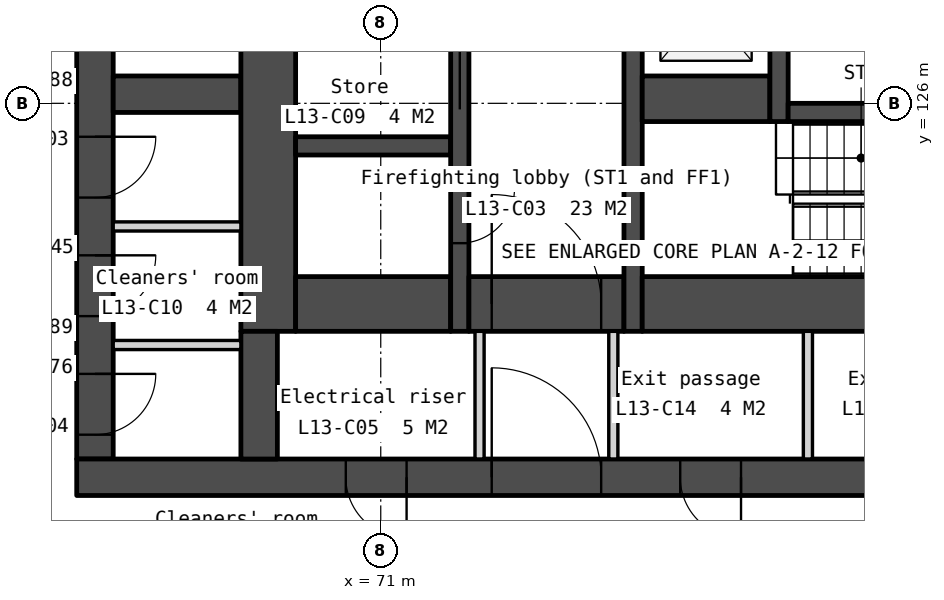
"""IFC4 building model, lengths in metres.
Left out: names, types, materials, properties, quantities, classifications, styles, units other than length and angle.
Written with IfcOpenShell. Run it as: python <this file> out.ifc"""

import sys

from ifc_helpers import new_model, si_unit, direction, frame, frame_2d, origin, place, context, subcontext, project, spatial, polyline, rectangle, outline, extrude, element, fill, save


model = new_model("IFC4")
c1 = context("Model", 3, precision=1e-05, world=origin(), true_north=direction((0.0, 1.0)))
c2 = subcontext(c1, "Body", "Model", "MODEL_VIEW")
j1 = project(units=[si_unit("LENGTHUNIT", "METRE"), si_unit("PLANEANGLEUNIT", "RADIAN")], contexts=[c1])
p1 = place(None, origin())
s1 = spatial("IfcSite", under=j1, at=p1, CompositionType="ELEMENT")
p2 = place(p1, origin())
s2 = spatial("IfcBuilding", under=s1, at=p2, CompositionType="ELEMENT")
p3 = place(p2, frame((0.0, 0.0, 59.5)))
s3 = spatial("IfcBuildingStorey", under=s2, at=p3, CompositionType="ELEMENT", Elevation=59.5)
p4 = place(p3, frame((66.3, 133.95, 0.0), z_axis=(0.0, 0.0, 1.0), x_axis=(0.0, -1.0, 0.0)))
e1 = element("IfcWall", 1, at=p4, inside=s3, PredefinedType="SOLIDWALL", context=c2, shape_type="SweptSolid", body=[
    extrude(rectangle(XDim=13.8, YDim=0.6, at=frame_2d((6.9, 0.0))), origin(), (0.0, 0.0, 1.0), 3.35),
])
p5 = place(p4, frame((0.6, 0.0, 0.0)))
e2 = element("IfcOpeningElement", 2, at=p5, cuts=e1, PredefinedType="OPENING", context=c2, shape_type="SweptSolid", body=[
    extrude(rectangle(XDim=1.1, YDim=2.1, at=frame_2d((0.55, 1.05))), frame((0.0, 0.31, 0.0), z_axis=(0.0, -1.0, 0.0), x_axis=(1.0, 0.0, 0.0)), (0.0, 0.0, 1.0), 0.62),
])
p6 = place(p4, frame((12.4, 0.0, 0.0)))
e3 = element("IfcOpeningElement", 3, at=p6, cuts=e1, PredefinedType="OPENING", context=c2, shape_type="SweptSolid", body=[
    extrude(rectangle(XDim=1.0, YDim=2.1, at=frame_2d((0.5, 1.05))), frame((0.0, 0.31, 0.0), z_axis=(0.0, -1.0, 0.0), x_axis=(1.0, 0.0, 0.0)), (0.0, 0.0, 1.0), 0.62),
])
p7 = place(p4, frame((8.5, 0.0, 0.0)))
e4 = element("IfcOpeningElement", 4, at=p7, cuts=e1, PredefinedType="OPENING", context=c2, shape_type="SweptSolid", body=[
    extrude(rectangle(XDim=1.0, YDim=2.1, at=frame_2d((0.5, 1.05))), frame((0.0, 0.31, 0.0), z_axis=(0.0, -1.0, 0.0), x_axis=(1.0, 0.0, 0.0)), (0.0, 0.0, 1.0), 0.62),
])
p8 = place(p4, frame((10.45, 0.0, 0.0)))
e5 = element("IfcOpeningElement", 5, at=p8, cuts=e1, PredefinedType="OPENING", context=c2, shape_type="SweptSolid", body=[
    extrude(rectangle(XDim=1.0, YDim=2.1, at=frame_2d((0.5, 1.05))), frame((0.0, 0.31, 0.0), z_axis=(0.0, -1.0, 0.0), x_axis=(1.0, 0.0, 0.0)), (0.0, 0.0, 1.0), 0.62),
])
p9 = place(p3, frame((66.0, 119.85, 0.0), z_axis=(0.0, 0.0, 1.0), x_axis=(1.0, 0.0, 0.0)))
e6 = element("IfcWall", 6, at=p9, inside=s3, PredefinedType="SOLIDWALL", context=c2, shape_type="SweptSolid", body=[
    extrude(rectangle(XDim=28.0, YDim=0.6, at=frame_2d((14.0, 0.0))), origin(), (0.0, 0.0, 1.0), 3.35),
])
p10 = place(p9, frame((6.825, 0.0, 0.0)))
e7 = element("IfcOpeningElement", 7, at=p10, cuts=e6, PredefinedType="OPENING", context=c2, shape_type="SweptSolid", body=[
    extrude(rectangle(XDim=1.8, YDim=2.1, at=frame_2d((0.9, 1.05))), frame((0.0, 0.31, 0.0), z_axis=(0.0, -1.0, 0.0), x_axis=(1.0, 0.0, 0.0)), (0.0, 0.0, 1.0), 0.62),
])
p11 = place(p9, frame((15.85, 0.0, 0.0)))
e8 = element("IfcOpeningElement", 8, at=p11, cuts=e6, PredefinedType="OPENING", context=c2, shape_type="SweptSolid", body=[
    extrude(rectangle(XDim=1.5, YDim=2.1, at=frame_2d((0.75, 1.05))), frame((0.0, 0.31, 0.0), z_axis=(0.0, -1.0, 0.0), x_axis=(1.0, 0.0, 0.0)), (0.0, 0.0, 1.0), 0.62),
])
p12 = place(p9, frame((19.375, 0.0, 0.0)))
e9 = element("IfcOpeningElement", 9, at=p12, cuts=e6, PredefinedType="OPENING", context=c2, shape_type="SweptSolid", body=[
    extrude(rectangle(XDim=1.8, YDim=2.1, at=frame_2d((0.9, 1.05))), frame((0.0, 0.31, 0.0), z_axis=(0.0, -1.0, 0.0), x_axis=(1.0, 0.0, 0.0)), (0.0, 0.0, 1.0), 0.62),
])
p13 = place(p9, frame((4.425, 0.0, 0.0)))
e10 = element("IfcOpeningElement", 10, at=p13, cuts=e6, PredefinedType="OPENING", context=c2, shape_type="SweptSolid", body=[
    extrude(rectangle(XDim=1.0, YDim=2.1, at=frame_2d((0.5, 1.05))), frame((0.0, 0.31, 0.0), z_axis=(0.0, -1.0, 0.0), x_axis=(1.0, 0.0, 0.0)), (0.0, 0.0, 1.0), 0.62),
])
p14 = place(p9, frame((9.925, 0.0, 0.0)))
e11 = element("IfcOpeningElement", 11, at=p14, cuts=e6, PredefinedType="OPENING", context=c2, shape_type="SweptSolid", body=[
    extrude(rectangle(XDim=1.0, YDim=2.1, at=frame_2d((0.5, 1.05))), frame((0.0, 0.31, 0.0), z_axis=(0.0, -1.0, 0.0), x_axis=(1.0, 0.0, 0.0)), (0.0, 0.0, 1.0), 0.62),
])
p15 = place(p9, frame((13.125, 0.0, 0.0)))
e12 = element("IfcOpeningElement", 12, at=p15, cuts=e6, PredefinedType="OPENING", context=c2, shape_type="SweptSolid", body=[
    extrude(rectangle(XDim=1.0, YDim=2.1, at=frame_2d((0.5, 1.05))), frame((0.0, 0.31, 0.0), z_axis=(0.0, -1.0, 0.0), x_axis=(1.0, 0.0, 0.0)), (0.0, 0.0, 1.0), 0.62),
])
p16 = place(p9, frame((21.725, 0.0, 0.0)))
e13 = element("IfcOpeningElement", 13, at=p16, cuts=e6, PredefinedType="OPENING", context=c2, shape_type="SweptSolid", body=[
    extrude(rectangle(XDim=1.0, YDim=2.1, at=frame_2d((0.5, 1.05))), frame((0.0, 0.31, 0.0), z_axis=(0.0, -1.0, 0.0), x_axis=(1.0, 0.0, 0.0)), (0.0, 0.0, 1.0), 0.62),
])
p17 = place(p9, frame((23.425, 0.0, 0.0)))
e14 = element("IfcOpeningElement", 14, at=p17, cuts=e6, PredefinedType="OPENING", context=c2, shape_type="SweptSolid", body=[
    extrude(rectangle(XDim=1.0, YDim=2.1, at=frame_2d((0.5, 1.05))), frame((0.0, 0.31, 0.0), z_axis=(0.0, -1.0, 0.0), x_axis=(1.0, 0.0, 0.0)), (0.0, 0.0, 1.0), 0.62),
])
p18 = place(p3, frame((66.6, 126.15, 0.0), z_axis=(0.0, 0.0, 1.0), x_axis=(1.0, 0.0, 0.0)))
e15 = element("IfcWall", 15, at=p18, inside=s3, PredefinedType="SOLIDWALL", context=c2, shape_type="SweptSolid", body=[
    extrude(rectangle(XDim=2.1, YDim=0.6, at=frame_2d((1.05, 0.0))), origin(), (0.0, 0.0, 1.0), 3.35),
])
for number, where, z_axis, x_axis in (
    (16, (66.6, 123.975, 0.0), (0.0, 0.0, 1.0), (1.0, 0.0, 0.0)),
    (17, (66.6, 122.025, 0.0), (0.0, 0.0, 1.0), (1.0, 0.0, 0.0)),
):
    element("IfcWall", number, at=place(p3, frame(where, z_axis=z_axis, x_axis=x_axis)), inside=s3, PredefinedType="PARTITIONING", context=c2, shape_type="SweptSolid", body=[
        extrude(rectangle(XDim=2.1, YDim=0.15, at=frame_2d((1.05, 0.0))), origin(), (0.0, 0.0, 1.0), 3.35),
    ])
p19 = place(p3, frame((69.15, 133.95, 0.0), z_axis=(0.0, 0.0, 1.0), x_axis=(0.0, -1.0, 0.0)))
e18 = element("IfcWall", 18, at=p19, inside=s3, PredefinedType="SOLIDWALL", context=c2, shape_type="SweptSolid", body=[
    extrude(rectangle(XDim=11.7, YDim=0.9, at=frame_2d((5.85, 0.0))), origin(), (0.0, 0.0, 1.0), 3.35),
])
p20 = place(p3, frame((69.0, 122.25, 0.0), z_axis=(0.0, 0.0, 1.0), x_axis=(0.0, -1.0, 0.0)))
e19 = element("IfcWall", 19, at=p20, inside=s3, PredefinedType="SOLIDWALL", context=c2, shape_type="SweptSolid", body=[
    extrude(rectangle(XDim=2.1, YDim=0.6, at=frame_2d((1.05, 0.0))), origin(), (0.0, 0.0, 1.0), 3.35),
])
p21 = place(p3, frame((69.6, 125.3, 0.0), z_axis=(0.0, 0.0, 1.0), x_axis=(1.0, 0.0, 0.0)))
e20 = element("IfcWall", 20, at=p21, inside=s3, PredefinedType="SOLIDWALL", context=c2, shape_type="SweptSolid", body=[
    extrude(rectangle(XDim=2.55, YDim=0.3, at=frame_2d((1.275, 0.0))), origin(), (0.0, 0.0, 1.0), 3.35),
])
p22 = place(p3, frame((69.6, 122.7, 0.0), z_axis=(0.0, 0.0, 1.0), x_axis=(1.0, 0.0, 0.0)))
e21 = element("IfcWall", 21, at=p22, inside=s3, PredefinedType="SOLIDWALL", context=c2, shape_type="SweptSolid", body=[
    extrude(rectangle(XDim=2.55, YDim=0.9, at=frame_2d((1.275, 0.0))), origin(), (0.0, 0.0, 1.0), 3.35),
])
p23 = place(p3, frame((72.3, 133.95, 0.0), z_axis=(0.0, 0.0, 1.0), x_axis=(0.0, -1.0, 0.0)))
e22 = element("IfcWall", 22, at=p23, inside=s3, PredefinedType="SOLIDWALL", context=c2, shape_type="SweptSolid", body=[
    extrude(rectangle(XDim=11.7, YDim=0.3, at=frame_2d((5.85, 0.0))), origin(), (0.0, 0.0, 1.0), 3.35),
])
p24 = place(p23, frame((6.95, 0.0, 0.0)))
e23 = element("IfcOpeningElement", 23, at=p24, cuts=e22, PredefinedType="OPENING", context=c2, shape_type="SweptSolid", body=[
    extrude(rectangle(XDim=1.1, YDim=2.1, at=frame_2d((0.55, 1.05))), frame((0.0, 0.16, 0.0), z_axis=(0.0, -1.0, 0.0), x_axis=(1.0, 0.0, 0.0)), (0.0, 0.0, 1.0), 0.32),
])
p25 = place(p23, frame((9.35, 0.0, 0.0)))
e24 = element("IfcOpeningElement", 24, at=p25, cuts=e22, PredefinedType="OPENING", context=c2, shape_type="SweptSolid", body=[
    extrude(rectangle(XDim=0.9, YDim=2.1, at=frame_2d((0.45, 1.05))), frame((0.0, 0.16, 0.0), z_axis=(0.0, -1.0, 0.0), x_axis=(1.0, 0.0, 0.0)), (0.0, 0.0, 1.0), 0.32),
])
p26 = place(p23, frame((5.1, 0.0, 0.0)))
e25 = element("IfcOpeningElement", 25, at=p26, cuts=e22, PredefinedType="OPENING", context=c2, shape_type="SweptSolid", body=[
    extrude(rectangle(XDim=1.0, YDim=2.1, at=frame_2d((0.5, 1.05))), frame((0.0, 0.16, 0.0), z_axis=(0.0, -1.0, 0.0), x_axis=(1.0, 0.0, 0.0)), (0.0, 0.0, 1.0), 0.32),
])
p27 = place(p3, frame((72.45, 122.7, 0.0), z_axis=(0.0, 0.0, 1.0), x_axis=(1.0, 0.0, 0.0)))
e26 = element("IfcWall", 26, at=p27, inside=s3, PredefinedType="SOLIDWALL", context=c2, shape_type="SweptSolid", body=[
    extrude(rectangle(XDim=2.55, YDim=0.9, at=frame_2d((1.275, 0.0))), origin(), (0.0, 0.0, 1.0), 3.35),
])
p28 = place(p27, frame((0.375, 0.0, 0.0)))
e27 = element("IfcOpeningElement", 27, at=p28, cuts=e26, PredefinedType="OPENING", context=c2, shape_type="SweptSolid", body=[
    extrude(rectangle(XDim=1.8, YDim=2.1, at=frame_2d((0.9, 1.05))), frame((0.0, 0.46, 0.0), z_axis=(0.0, -1.0, 0.0), x_axis=(1.0, 0.0, 0.0)), (0.0, 0.0, 1.0), 0.92),
])
for number, where, z_axis, x_axis in (
    (28, (72.625, 122.25, 0.0), (0.0, 0.0, 1.0), (0.0, -1.0, 0.0)),
    (29, (74.825, 122.25, 0.0), (0.0, 0.0, 1.0), (0.0, -1.0, 0.0)),
):
    element("IfcWall", number, at=place(p3, frame(where, z_axis=z_axis, x_axis=x_axis)), inside=s3, PredefinedType="PARTITIONING", context=c2, shape_type="SweptSolid", body=[
        extrude(rectangle(XDim=2.1, YDim=0.15, at=frame_2d((1.05, 0.0))), origin(), (0.0, 0.0, 1.0), 3.35),
    ])
p29 = place(p3, frame((75.15, 133.95, 0.0), z_axis=(0.0, 0.0, 1.0), x_axis=(0.0, -1.0, 0.0)))
e30 = element("IfcWall", 30, at=p29, inside=s3, PredefinedType="SOLIDWALL", context=c2, shape_type="SweptSolid", body=[
    extrude(rectangle(XDim=11.7, YDim=0.3, at=frame_2d((5.85, 0.0))), origin(), (0.0, 0.0, 1.0), 3.35),
])
p30 = place(p3, frame((75.3, 126.075, 0.0), z_axis=(0.0, 0.0, 1.0), x_axis=(1.0, 0.0, 0.0)))
e31 = element("IfcWall", 31, at=p30, inside=s3, PredefinedType="SOLIDWALL", context=c2, shape_type="SweptSolid", body=[
    extrude(rectangle(XDim=2.1, YDim=0.75, at=frame_2d((1.05, 0.0))), origin(), (0.0, 0.0, 1.0), 3.35),
])
p31 = place(p3, frame((75.3, 122.7, 0.0), z_axis=(0.0, 0.0, 1.0), x_axis=(1.0, 0.0, 0.0)))
e32 = element("IfcWall", 32, at=p31, inside=s3, PredefinedType="SOLIDWALL", context=c2, shape_type="SweptSolid", body=[
    extrude(rectangle(XDim=6.2, YDim=0.9, at=frame_2d((3.1, 0.0))), origin(), (0.0, 0.0, 1.0), 3.35),
])
p32 = place(p3, frame((77.55, 133.95, 0.0), z_axis=(0.0, 0.0, 1.0), x_axis=(0.0, -1.0, 0.0)))
e33 = element("IfcWall", 33, at=p32, inside=s3, PredefinedType="SOLIDWALL", context=c2, shape_type="SweptSolid", body=[
    extrude(rectangle(XDim=8.25, YDim=0.3, at=frame_2d((4.125, 0.0))), origin(), (0.0, 0.0, 1.0), 3.35),
])
p33 = place(p32, frame((0.6, 0.0, 0.0)))
e34 = element("IfcOpeningElement", 34, at=p33, cuts=e33, PredefinedType="OPENING", context=c2, shape_type="SweptSolid", body=[
    extrude(rectangle(XDim=1.1, YDim=2.1, at=frame_2d((0.55, 1.05))), frame((0.0, 0.16, 0.0), z_axis=(0.0, -1.0, 0.0), x_axis=(1.0, 0.0, 0.0)), (0.0, 0.0, 1.0), 0.32),
])
p34 = place(p32, frame((3.2, 0.0, 0.0)))
e35 = element("IfcOpeningElement", 35, at=p34, cuts=e33, PredefinedType="OPENING", context=c2, shape_type="SweptSolid", body=[
    extrude(rectangle(XDim=1.1, YDim=2.1, at=frame_2d((0.55, 1.05))), frame((0.0, 0.16, 0.0), z_axis=(0.0, -1.0, 0.0), x_axis=(1.0, 0.0, 0.0)), (0.0, 0.0, 1.0), 0.32),
])
p35 = place(p32, frame((5.8, 0.0, 0.0)))
e36 = element("IfcOpeningElement", 36, at=p35, cuts=e33, PredefinedType="OPENING", context=c2, shape_type="SweptSolid", body=[
    extrude(rectangle(XDim=1.1, YDim=2.1, at=frame_2d((0.55, 1.05))), frame((0.0, 0.16, 0.0), z_axis=(0.0, -1.0, 0.0), x_axis=(1.0, 0.0, 0.0)), (0.0, 0.0, 1.0), 0.32),
])
p36 = place(p3, frame((77.7, 125.85, 0.0), z_axis=(0.0, 0.0, 1.0), x_axis=(1.0, 0.0, 0.0)))
e37 = element("IfcWall", 37, at=p36, inside=s3, PredefinedType="SOLIDWALL", context=c2, shape_type="SweptSolid", body=[
    extrude(rectangle(XDim=4.6, YDim=0.3, at=frame_2d((2.3, 0.0))), origin(), (0.0, 0.0, 1.0), 3.35),
])
p37 = place(p3, frame((78.025, 122.25, 0.0), z_axis=(0.0, 0.0, 1.0), x_axis=(0.0, -1.0, 0.0)))
e38 = element("IfcWall", 38, at=p37, inside=s3, PredefinedType="PARTITIONING", context=c2, shape_type="SweptSolid", body=[
    extrude(rectangle(XDim=2.1, YDim=0.15, at=frame_2d((1.05, 0.0))), origin(), (0.0, 0.0, 1.0), 3.35),
])
p38 = place(p3, frame((54.495, 129.397, -0.15), z_axis=(0.0, 0.0, 1.0), x_axis=(0.499999201451, -0.866025864826, 0.0)))
e39 = element("IfcWall", 39, at=p38, inside=s3, PredefinedType="SOLIDWALL", context=c2, shape_type="SweptSolid", body=[
    extrude(outline(polyline([(44.8, 0.0), (44.8, 3.5), (0.0, 3.5), (0.0, 0.0), (44.8, 0.0)])), frame((0.0, 0.225, 0.0), z_axis=(0.0, -1.0, 0.0), x_axis=(1.0, 0.0, 0.0)), (0.0, 0.0, 1.0), 0.45),
])
p39 = place(p38, frame((3.03, 0.0, 1.05)))
e40 = element("IfcOpeningElement", 40, at=p39, cuts=e39, PredefinedType="OPENING", context=c2, shape_type="SweptSolid", body=[
    extrude(rectangle(XDim=1.2, YDim=1.5, at=frame_2d((0.6, 0.75))), frame((0.0, 0.235, 0.0), z_axis=(0.0, -1.0, 0.0), x_axis=(1.0, 0.0, 0.0)), (0.0, 0.0, 1.0), 0.47),
])
p40 = place(p38, frame((4.73, 0.0, 1.05)))
e41 = element("IfcOpeningElement", 41, at=p40, cuts=e39, PredefinedType="OPENING", context=c2, shape_type="SweptSolid", body=[
    extrude(rectangle(XDim=1.2, YDim=1.5, at=frame_2d((0.6, 0.75))), frame((0.0, 0.235, 0.0), z_axis=(0.0, -1.0, 0.0), x_axis=(1.0, 0.0, 0.0)), (0.0, 0.0, 1.0), 0.47),
])
p41 = place(p38, frame((11.99, 0.0, 1.05)))
e42 = element("IfcOpeningElement", 42, at=p41, cuts=e39, PredefinedType="OPENING", context=c2, shape_type="SweptSolid", body=[
    extrude(rectangle(XDim=1.2, YDim=1.5, at=frame_2d((0.6, 0.75))), frame((0.0, 0.235, 0.0), z_axis=(0.0, -1.0, 0.0), x_axis=(1.0, 0.0, 0.0)), (0.0, 0.0, 1.0), 0.47),
])
p42 = place(p38, frame((13.69, 0.0, 1.05)))
e43 = element("IfcOpeningElement", 43, at=p42, cuts=e39, PredefinedType="OPENING", context=c2, shape_type="SweptSolid", body=[
    extrude(rectangle(XDim=1.2, YDim=1.5, at=frame_2d((0.6, 0.75))), frame((0.0, 0.235, 0.0), z_axis=(0.0, -1.0, 0.0), x_axis=(1.0, 0.0, 0.0)), (0.0, 0.0, 1.0), 0.47),
])
p43 = place(p38, frame((20.95, 0.0, 1.05)))
e44 = element("IfcOpeningElement", 44, at=p43, cuts=e39, PredefinedType="OPENING", context=c2, shape_type="SweptSolid", body=[
    extrude(rectangle(XDim=1.2, YDim=1.5, at=frame_2d((0.6, 0.75))), frame((0.0, 0.235, 0.0), z_axis=(0.0, -1.0, 0.0), x_axis=(1.0, 0.0, 0.0)), (0.0, 0.0, 1.0), 0.47),
])
p44 = place(p38, frame((22.65, 0.0, 1.05)))
e45 = element("IfcOpeningElement", 45, at=p44, cuts=e39, PredefinedType="OPENING", context=c2, shape_type="SweptSolid", body=[
    extrude(rectangle(XDim=1.2, YDim=1.5, at=frame_2d((0.6, 0.75))), frame((0.0, 0.235, 0.0), z_axis=(0.0, -1.0, 0.0), x_axis=(1.0, 0.0, 0.0)), (0.0, 0.0, 1.0), 0.47),
])
p45 = place(p38, frame((29.91, 0.0, 1.05)))
e46 = element("IfcOpeningElement", 46, at=p45, cuts=e39, PredefinedType="OPENING", context=c2, shape_type="SweptSolid", body=[
    extrude(rectangle(XDim=1.2, YDim=1.5, at=frame_2d((0.6, 0.75))), frame((0.0, 0.235, 0.0), z_axis=(0.0, -1.0, 0.0), x_axis=(1.0, 0.0, 0.0)), (0.0, 0.0, 1.0), 0.47),
])
p46 = place(p38, frame((31.61, 0.0, 1.05)))
e47 = element("IfcOpeningElement", 47, at=p46, cuts=e39, PredefinedType="OPENING", context=c2, shape_type="SweptSolid", body=[
    extrude(rectangle(XDim=1.2, YDim=1.5, at=frame_2d((0.6, 0.75))), frame((0.0, 0.235, 0.0), z_axis=(0.0, -1.0, 0.0), x_axis=(1.0, 0.0, 0.0)), (0.0, 0.0, 1.0), 0.47),
])
p47 = place(p38, frame((38.87, 0.0, 1.05)))
e48 = element("IfcOpeningElement", 48, at=p47, cuts=e39, PredefinedType="OPENING", context=c2, shape_type="SweptSolid", body=[
    extrude(rectangle(XDim=1.2, YDim=1.5, at=frame_2d((0.6, 0.75))), frame((0.0, 0.235, 0.0), z_axis=(0.0, -1.0, 0.0), x_axis=(1.0, 0.0, 0.0)), (0.0, 0.0, 1.0), 0.47),
])
p48 = place(p38, frame((40.57, 0.0, 1.05)))
e49 = element("IfcOpeningElement", 49, at=p48, cuts=e39, PredefinedType="OPENING", context=c2, shape_type="SweptSolid", body=[
    extrude(rectangle(XDim=1.2, YDim=1.5, at=frame_2d((0.6, 0.75))), frame((0.0, 0.235, 0.0), z_axis=(0.0, -1.0, 0.0), x_axis=(1.0, 0.0, 0.0)), (0.0, 0.0, 1.0), 0.47),
])
p49 = place(p24, origin())
e50 = element("IfcDoor", 50, at=p49, inside=s3, OperationType="SLIDING_TO_LEFT", PredefinedType="DOOR", context=c2, shape_type="SweptSolid", body=[
    extrude(rectangle(XDim=1.1, YDim=2.1, at=frame_2d((0.55, 1.05))), frame((0.0, 0.025, 0.0), z_axis=(0.0, -1.0, 0.0), x_axis=(1.0, 0.0, 0.0)), (0.0, 0.0, 1.0), 0.05),
])
fill(e23, e50)
p50 = place(p28, origin())
e51 = element("IfcDoor", 51, at=p50, inside=s3, OperationType="DOUBLE_DOOR_DOUBLE_SWING", PredefinedType="DOOR", context=c2, shape_type="SweptSolid", body=[
    extrude(rectangle(XDim=1.8, YDim=2.1, at=frame_2d((0.9, 1.05))), frame((0.0, 0.025, 0.0), z_axis=(0.0, -1.0, 0.0), x_axis=(1.0, 0.0, 0.0)), (0.0, 0.0, 1.0), 0.05),
])
fill(e27, e51)
p51 = place(p10, origin())
e52 = element("IfcDoor", 52, at=p51, inside=s3, OperationType="DOUBLE_DOOR_DOUBLE_SWING", PredefinedType="DOOR", context=c2, shape_type="SweptSolid", body=[
    extrude(rectangle(XDim=1.8, YDim=2.1, at=frame_2d((0.9, 1.05))), frame((0.0, 0.025, 0.0), z_axis=(0.0, -1.0, 0.0), x_axis=(1.0, 0.0, 0.0)), (0.0, 0.0, 1.0), 0.05),
])
fill(e7, e52)
p52 = place(p25, origin())
e53 = element("IfcDoor", 53, at=p52, inside=s3, OperationType="SINGLE_SWING_LEFT", PredefinedType="DOOR", context=c2, shape_type="SweptSolid", body=[
    extrude(rectangle(XDim=0.9, YDim=2.1, at=frame_2d((0.45, 1.05))), frame((0.0, 0.025, 0.0), z_axis=(0.0, -1.0, 0.0), x_axis=(1.0, 0.0, 0.0)), (0.0, 0.0, 1.0), 0.05),
])
fill(e24, e53)
p53 = place(p13, origin())
e54 = element("IfcDoor", 54, at=p53, inside=s3, OperationType="SINGLE_SWING_RIGHT", PredefinedType="DOOR", context=c2, shape_type="SweptSolid", body=[
    extrude(rectangle(XDim=1.0, YDim=2.1, at=frame_2d((0.5, 1.05))), frame((0.0, 0.025, 0.0), z_axis=(0.0, -1.0, 0.0), x_axis=(1.0, 0.0, 0.0)), (0.0, 0.0, 1.0), 0.05),
])
fill(e10, e54)
p54 = place(p14, origin())
e55 = element("IfcDoor", 55, at=p54, inside=s3, OperationType="SINGLE_SWING_RIGHT", PredefinedType="DOOR", context=c2, shape_type="SweptSolid", body=[
    extrude(rectangle(XDim=1.0, YDim=2.1, at=frame_2d((0.5, 1.05))), frame((0.0, 0.025, 0.0), z_axis=(0.0, -1.0, 0.0), x_axis=(1.0, 0.0, 0.0)), (0.0, 0.0, 1.0), 0.05),
])
fill(e11, e55)
p55 = place(p6, origin())
e56 = element("IfcDoor", 56, at=p55, inside=s3, OperationType="SINGLE_SWING_LEFT", PredefinedType="DOOR", context=c2, shape_type="SweptSolid", body=[
    extrude(rectangle(XDim=1.0, YDim=2.1, at=frame_2d((0.5, 1.05))), frame((0.0, 0.025, 0.0), z_axis=(0.0, -1.0, 0.0), x_axis=(1.0, 0.0, 0.0)), (0.0, 0.0, 1.0), 0.05),
])
fill(e3, e56)
p56 = place(p7, origin())
e57 = element("IfcDoor", 57, at=p56, inside=s3, OperationType="SINGLE_SWING_LEFT", PredefinedType="DOOR", context=c2, shape_type="SweptSolid", body=[
    extrude(rectangle(XDim=1.0, YDim=2.1, at=frame_2d((0.5, 1.05))), frame((0.0, 0.025, 0.0), z_axis=(0.0, -1.0, 0.0), x_axis=(1.0, 0.0, 0.0)), (0.0, 0.0, 1.0), 0.05),
])
fill(e4, e57)
p57 = place(p8, origin())
e58 = element("IfcDoor", 58, at=p57, inside=s3, OperationType="SINGLE_SWING_LEFT", PredefinedType="DOOR", context=c2, shape_type="SweptSolid", body=[
    extrude(rectangle(XDim=1.0, YDim=2.1, at=frame_2d((0.5, 1.05))), frame((0.0, 0.025, 0.0), z_axis=(0.0, -1.0, 0.0), x_axis=(1.0, 0.0, 0.0)), (0.0, 0.0, 1.0), 0.05),
])
fill(e5, e58)
save(model, sys.argv[1])
